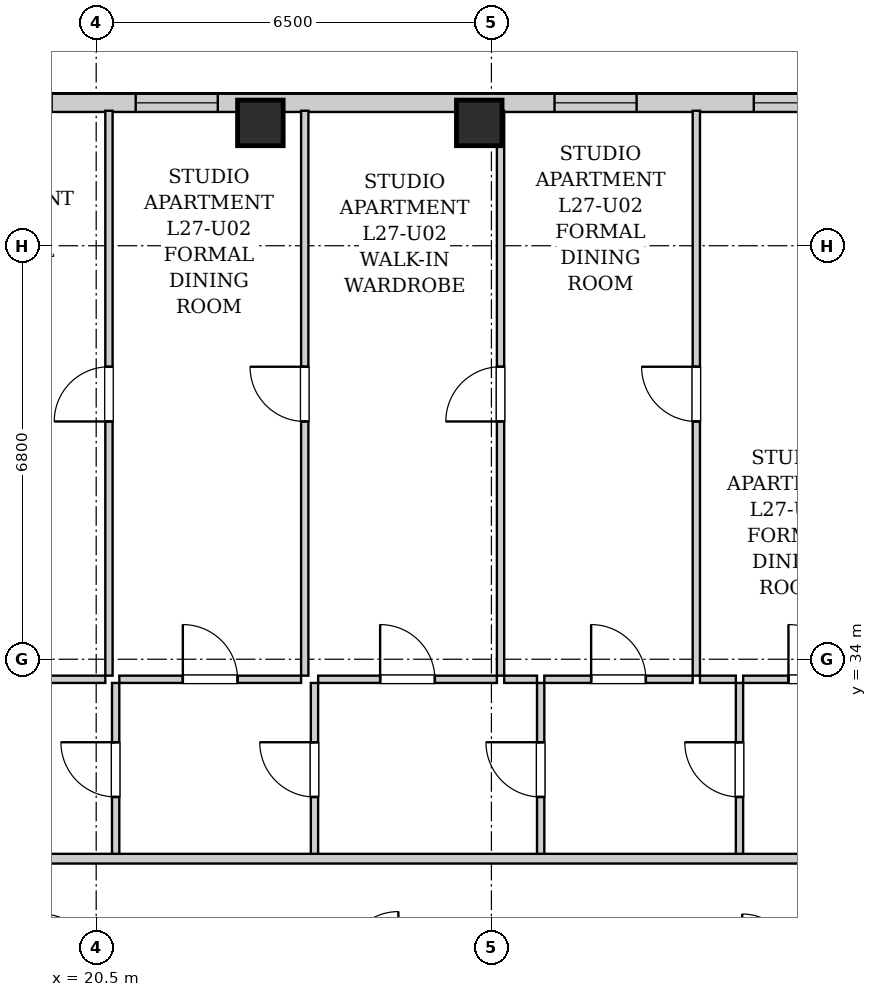
"""IFC4 building model, lengths in metres.
Left out: names, types, materials, properties, quantities, classifications, styles, units other than length and angle.
Written with IfcOpenShell. Run it as: python <this file> out.ifc"""

import sys

from ifc_helpers import new_model, si_unit, direction, frame, frame_2d, origin, origin_2d, place, context, subcontext, project, spatial, rectangle, extrude, element, fill, save


model = new_model("IFC4")
c1 = context("Model", 3, precision=1e-05, world=origin(), true_north=direction((0.0, 1.0)))
c2 = subcontext(c1, "Body", "Model", "MODEL_VIEW")
j1 = project(units=[si_unit("LENGTHUNIT", "METRE"), si_unit("PLANEANGLEUNIT", "RADIAN")], contexts=[c1])
p1 = place(None, origin())
s1 = spatial("IfcSite", under=j1, at=p1, CompositionType="ELEMENT")
p2 = place(p1, origin())
s2 = spatial("IfcBuilding", under=s1, at=p2, CompositionType="ELEMENT")
p3 = place(p2, frame((0.0, 0.0, 97.5)))
s3 = spatial("IfcBuildingStorey", under=s2, at=p3, CompositionType="ELEMENT", Elevation=97.5)
for number, where, z_axis, x_axis in (
    (1, (23.2, 42.82, 0.0), (0.0, 0.0, 1.0), (1.0, 0.0, 0.0)),
    (2, (26.8, 42.82, 0.0), (0.0, 0.0, 1.0), (1.0, 0.0, 0.0)),
):
    element("IfcColumn", number, at=place(p3, frame(where, z_axis=z_axis, x_axis=x_axis)), inside=s3, PredefinedType="COLUMN", context=c2, shape_type="SweptSolid", body=[
        extrude(rectangle(XDim=0.75, YDim=0.75, at=origin_2d()), origin(), (0.0, 0.0, 1.0), 3.2),
    ])
p4 = place(p3, frame((10.0, 43.15, 0.0), z_axis=(0.0, 0.0, 1.0), x_axis=(1.0, 0.0, 0.0)))
e3 = element("IfcWall", 3, at=p4, inside=s3, PredefinedType="SOLIDWALL", context=c2, shape_type="SweptSolid", body=[
    extrude(rectangle(XDim=24.35, YDim=0.3, at=frame_2d((12.175, 0.0))), origin(), (0.0, 0.0, 1.0), 2.94),
])
p5 = place(p4, frame((1.956, 0.0, 0.55)))
e4 = element("IfcOpeningElement", 4, at=p5, cuts=e3, PredefinedType="OPENING", context=c2, shape_type="SweptSolid", body=[
    extrude(rectangle(XDim=1.35, YDim=1.2, at=frame_2d((0.675, 0.6))), frame((0.0, 0.16, 0.0), z_axis=(0.0, -1.0, 0.0), x_axis=(1.0, 0.0, 0.0)), (0.0, 0.0, 1.0), 0.32),
])
p6 = place(p4, frame((5.187, 0.0, 0.55)))
e5 = element("IfcOpeningElement", 5, at=p6, cuts=e3, PredefinedType="OPENING", context=c2, shape_type="SweptSolid", body=[
    extrude(rectangle(XDim=1.35, YDim=1.2, at=frame_2d((0.675, 0.6))), frame((0.0, 0.16, 0.0), z_axis=(0.0, -1.0, 0.0), x_axis=(1.0, 0.0, 0.0)), (0.0, 0.0, 1.0), 0.32),
])
p7 = place(p4, frame((8.418, 0.0, 0.55)))
e6 = element("IfcOpeningElement", 6, at=p7, cuts=e3, PredefinedType="OPENING", context=c2, shape_type="SweptSolid", body=[
    extrude(rectangle(XDim=1.35, YDim=1.2, at=frame_2d((0.675, 0.6))), frame((0.0, 0.16, 0.0), z_axis=(0.0, -1.0, 0.0), x_axis=(1.0, 0.0, 0.0)), (0.0, 0.0, 1.0), 0.32),
])
p8 = place(p4, frame((11.15, 0.0, 0.55)))
e7 = element("IfcOpeningElement", 7, at=p8, cuts=e3, PredefinedType="OPENING", context=c2, shape_type="SweptSolid", body=[
    extrude(rectangle(XDim=1.35, YDim=1.2, at=frame_2d((0.675, 0.6))), frame((0.0, 0.16, 0.0), z_axis=(0.0, -1.0, 0.0), x_axis=(1.0, 0.0, 0.0)), (0.0, 0.0, 1.0), 0.32),
])
p9 = place(p4, frame((18.038, 0.0, 0.55)))
e8 = element("IfcOpeningElement", 8, at=p9, cuts=e3, PredefinedType="OPENING", context=c2, shape_type="SweptSolid", body=[
    extrude(rectangle(XDim=1.35, YDim=1.2, at=frame_2d((0.675, 0.6))), frame((0.0, 0.16, 0.0), z_axis=(0.0, -1.0, 0.0), x_axis=(1.0, 0.0, 0.0)), (0.0, 0.0, 1.0), 0.32),
])
p10 = place(p4, frame((21.315, 0.0, 0.55)))
e9 = element("IfcOpeningElement", 9, at=p10, cuts=e3, PredefinedType="OPENING", context=c2, shape_type="SweptSolid", body=[
    extrude(rectangle(XDim=1.35, YDim=1.2, at=frame_2d((0.675, 0.6))), frame((0.0, 0.16, 0.0), z_axis=(0.0, -1.0, 0.0), x_axis=(1.0, 0.0, 0.0)), (0.0, 0.0, 1.0), 0.32),
])
p11 = place(p3, frame((20.82, 30.76, 0.0), z_axis=(0.0, 0.0, 1.0), x_axis=(0.0, 1.0, 0.0)))
e10 = element("IfcWall", 10, at=p11, inside=s3, PredefinedType="PARTITIONING", context=c2, shape_type="SweptSolid", body=[
    extrude(rectangle(XDim=2.85, YDim=0.12, at=frame_2d((1.425, 0.0))), origin(), (0.0, 0.0, 1.0), 2.94),
])
p12 = place(p11, frame((0.975, 0.0, 0.0)))
e11 = element("IfcOpeningElement", 11, at=p12, cuts=e10, PredefinedType="OPENING", context=c2, shape_type="SweptSolid", body=[
    extrude(rectangle(XDim=0.9, YDim=2.05, at=frame_2d((0.45, 1.025))), frame((0.0, 0.07, 0.0), z_axis=(0.0, -1.0, 0.0), x_axis=(1.0, 0.0, 0.0)), (0.0, 0.0, 1.0), 0.14),
])
p13 = place(p3, frame((17.55, 33.67, 0.0), z_axis=(0.0, 0.0, 1.0), x_axis=(1.0, 0.0, 0.0)))
e12 = element("IfcWall", 12, at=p13, inside=s3, PredefinedType="PARTITIONING", context=c2, shape_type="SweptSolid", body=[
    extrude(rectangle(XDim=3.1, YDim=0.12, at=frame_2d((1.55, 0.0))), origin(), (0.0, 0.0, 1.0), 2.94),
])
p14 = place(p13, frame((1.1, 0.0, 0.0)))
e13 = element("IfcOpeningElement", 13, at=p14, cuts=e12, PredefinedType="OPENING", context=c2, shape_type="SweptSolid", body=[
    extrude(rectangle(XDim=0.9, YDim=2.05, at=frame_2d((0.45, 1.025))), frame((0.0, 0.07, 0.0), z_axis=(0.0, -1.0, 0.0), x_axis=(1.0, 0.0, 0.0)), (0.0, 0.0, 1.0), 0.14),
])
p15 = place(p3, frame((24.09, 30.76, 0.0), z_axis=(0.0, 0.0, 1.0), x_axis=(0.0, 1.0, 0.0)))
e14 = element("IfcWall", 14, at=p15, inside=s3, PredefinedType="PARTITIONING", context=c2, shape_type="SweptSolid", body=[
    extrude(rectangle(XDim=2.85, YDim=0.12, at=frame_2d((1.425, 0.0))), origin(), (0.0, 0.0, 1.0), 2.94),
])
p16 = place(p15, frame((0.975, 0.0, 0.0)))
e15 = element("IfcOpeningElement", 15, at=p16, cuts=e14, PredefinedType="OPENING", context=c2, shape_type="SweptSolid", body=[
    extrude(rectangle(XDim=0.9, YDim=2.05, at=frame_2d((0.45, 1.025))), frame((0.0, 0.07, 0.0), z_axis=(0.0, -1.0, 0.0), x_axis=(1.0, 0.0, 0.0)), (0.0, 0.0, 1.0), 0.14),
])
p17 = place(p3, frame((20.88, 33.67, 0.0), z_axis=(0.0, 0.0, 1.0), x_axis=(1.0, 0.0, 0.0)))
e16 = element("IfcWall", 16, at=p17, inside=s3, PredefinedType="PARTITIONING", context=c2, shape_type="SweptSolid", body=[
    extrude(rectangle(XDim=2.99, YDim=0.12, at=frame_2d((1.495, 0.0))), origin(), (0.0, 0.0, 1.0), 2.94),
])
p18 = place(p17, frame((1.045, 0.0, 0.0)))
e17 = element("IfcOpeningElement", 17, at=p18, cuts=e16, PredefinedType="OPENING", context=c2, shape_type="SweptSolid", body=[
    extrude(rectangle(XDim=0.9, YDim=2.05, at=frame_2d((0.45, 1.025))), frame((0.0, 0.07, 0.0), z_axis=(0.0, -1.0, 0.0), x_axis=(1.0, 0.0, 0.0)), (0.0, 0.0, 1.0), 0.14),
])
p19 = place(p3, frame((27.81, 30.76, 0.0), z_axis=(0.0, 0.0, 1.0), x_axis=(0.0, 1.0, 0.0)))
e18 = element("IfcWall", 18, at=p19, inside=s3, PredefinedType="PARTITIONING", context=c2, shape_type="SweptSolid", body=[
    extrude(rectangle(XDim=2.85, YDim=0.12, at=frame_2d((1.425, 0.0))), origin(), (0.0, 0.0, 1.0), 2.94),
])
p20 = place(p19, frame((0.975, 0.0, 0.0)))
e19 = element("IfcOpeningElement", 19, at=p20, cuts=e18, PredefinedType="OPENING", context=c2, shape_type="SweptSolid", body=[
    extrude(rectangle(XDim=0.9, YDim=2.05, at=frame_2d((0.45, 1.025))), frame((0.0, 0.07, 0.0), z_axis=(0.0, -1.0, 0.0), x_axis=(1.0, 0.0, 0.0)), (0.0, 0.0, 1.0), 0.14),
])
p21 = place(p3, frame((24.15, 33.67, 0.0), z_axis=(0.0, 0.0, 1.0), x_axis=(1.0, 0.0, 0.0)))
e20 = element("IfcWall", 20, at=p21, inside=s3, PredefinedType="PARTITIONING", context=c2, shape_type="SweptSolid", body=[
    extrude(rectangle(XDim=2.94, YDim=0.12, at=frame_2d((1.47, 0.0))), origin(), (0.0, 0.0, 1.0), 2.94),
])
p22 = place(p21, frame((1.02, 0.0, 0.0)))
e21 = element("IfcOpeningElement", 21, at=p22, cuts=e20, PredefinedType="OPENING", context=c2, shape_type="SweptSolid", body=[
    extrude(rectangle(XDim=0.9, YDim=2.05, at=frame_2d((0.45, 1.025))), frame((0.0, 0.07, 0.0), z_axis=(0.0, -1.0, 0.0), x_axis=(1.0, 0.0, 0.0)), (0.0, 0.0, 1.0), 0.14),
])
p23 = place(p3, frame((27.21, 33.67, 0.0), z_axis=(0.0, 0.0, 1.0), x_axis=(1.0, 0.0, 0.0)))
e22 = element("IfcWall", 22, at=p23, inside=s3, PredefinedType="PARTITIONING", context=c2, shape_type="SweptSolid", body=[
    extrude(rectangle(XDim=0.54, YDim=0.12, at=frame_2d((0.27, 0.0))), origin(), (0.0, 0.0, 1.0), 2.94),
])
p24 = place(p3, frame((31.08, 30.76, 0.0), z_axis=(0.0, 0.0, 1.0), x_axis=(0.0, 1.0, 0.0)))
e23 = element("IfcWall", 23, at=p24, inside=s3, PredefinedType="PARTITIONING", context=c2, shape_type="SweptSolid", body=[
    extrude(rectangle(XDim=2.85, YDim=0.12, at=frame_2d((1.425, 0.0))), origin(), (0.0, 0.0, 1.0), 2.94),
])
p25 = place(p24, frame((0.975, 0.0, 0.0)))
e24 = element("IfcOpeningElement", 24, at=p25, cuts=e23, PredefinedType="OPENING", context=c2, shape_type="SweptSolid", body=[
    extrude(rectangle(XDim=0.9, YDim=2.05, at=frame_2d((0.45, 1.025))), frame((0.0, 0.07, 0.0), z_axis=(0.0, -1.0, 0.0), x_axis=(1.0, 0.0, 0.0)), (0.0, 0.0, 1.0), 0.14),
])
p26 = place(p3, frame((27.87, 33.67, 0.0), z_axis=(0.0, 0.0, 1.0), x_axis=(1.0, 0.0, 0.0)))
e25 = element("IfcWall", 25, at=p26, inside=s3, PredefinedType="PARTITIONING", context=c2, shape_type="SweptSolid", body=[
    extrude(rectangle(XDim=2.44, YDim=0.12, at=frame_2d((1.22, 0.0))), origin(), (0.0, 0.0, 1.0), 2.94),
])
p27 = place(p26, frame((0.77, 0.0, 0.0)))
e26 = element("IfcOpeningElement", 26, at=p27, cuts=e25, PredefinedType="OPENING", context=c2, shape_type="SweptSolid", body=[
    extrude(rectangle(XDim=0.9, YDim=2.05, at=frame_2d((0.45, 1.025))), frame((0.0, 0.07, 0.0), z_axis=(0.0, -1.0, 0.0), x_axis=(1.0, 0.0, 0.0)), (0.0, 0.0, 1.0), 0.14),
])
p28 = place(p3, frame((30.43, 33.67, 0.0), z_axis=(0.0, 0.0, 1.0), x_axis=(1.0, 0.0, 0.0)))
e27 = element("IfcWall", 27, at=p28, inside=s3, PredefinedType="PARTITIONING", context=c2, shape_type="SweptSolid", body=[
    extrude(rectangle(XDim=0.59, YDim=0.12, at=frame_2d((0.295, 0.0))), origin(), (0.0, 0.0, 1.0), 2.94),
])
p29 = place(p3, frame((31.14, 33.67, 0.0), z_axis=(0.0, 0.0, 1.0), x_axis=(1.0, 0.0, 0.0)))
e28 = element("IfcWall", 28, at=p29, inside=s3, PredefinedType="PARTITIONING", context=c2, shape_type="SweptSolid", body=[
    extrude(rectangle(XDim=2.39, YDim=0.12, at=frame_2d((1.195, 0.0))), origin(), (0.0, 0.0, 1.0), 2.94),
])
p30 = place(p29, frame((0.745, 0.0, 0.0)))
e29 = element("IfcOpeningElement", 29, at=p30, cuts=e28, PredefinedType="OPENING", context=c2, shape_type="SweptSolid", body=[
    extrude(rectangle(XDim=0.9, YDim=2.05, at=frame_2d((0.45, 1.025))), frame((0.0, 0.07, 0.0), z_axis=(0.0, -1.0, 0.0), x_axis=(1.0, 0.0, 0.0)), (0.0, 0.0, 1.0), 0.14),
])
p31 = place(p3, frame((20.71, 33.73, 0.0), z_axis=(0.0, 0.0, 1.0), x_axis=(0.0, 1.0, 0.0)))
e30 = element("IfcWall", 30, at=p31, inside=s3, PredefinedType="PARTITIONING", context=c2, shape_type="SweptSolid", body=[
    extrude(rectangle(XDim=9.29, YDim=0.12, at=frame_2d((4.645, 0.0))), origin(), (0.0, 0.0, 1.0), 2.94),
])
p32 = place(p31, frame((4.18, 0.0, 0.0)))
e31 = element("IfcOpeningElement", 31, at=p32, cuts=e30, PredefinedType="OPENING", context=c2, shape_type="SweptSolid", body=[
    extrude(rectangle(XDim=0.9, YDim=2.05, at=frame_2d((0.45, 1.025))), frame((0.0, 0.07, 0.0), z_axis=(0.0, -1.0, 0.0), x_axis=(1.0, 0.0, 0.0)), (0.0, 0.0, 1.0), 0.14),
])
p33 = place(p3, frame((23.93, 33.73, 0.0), z_axis=(0.0, 0.0, 1.0), x_axis=(0.0, 1.0, 0.0)))
e32 = element("IfcWall", 32, at=p33, inside=s3, PredefinedType="PARTITIONING", context=c2, shape_type="SweptSolid", body=[
    extrude(rectangle(XDim=9.29, YDim=0.12, at=frame_2d((4.645, 0.0))), origin(), (0.0, 0.0, 1.0), 2.94),
])
p34 = place(p33, frame((4.18, 0.0, 0.0)))
e33 = element("IfcOpeningElement", 33, at=p34, cuts=e32, PredefinedType="OPENING", context=c2, shape_type="SweptSolid", body=[
    extrude(rectangle(XDim=0.9, YDim=2.05, at=frame_2d((0.45, 1.025))), frame((0.0, 0.07, 0.0), z_axis=(0.0, -1.0, 0.0), x_axis=(1.0, 0.0, 0.0)), (0.0, 0.0, 1.0), 0.14),
])
p35 = place(p3, frame((27.15, 33.73, 0.0), z_axis=(0.0, 0.0, 1.0), x_axis=(0.0, 1.0, 0.0)))
e34 = element("IfcWall", 34, at=p35, inside=s3, PredefinedType="PARTITIONING", context=c2, shape_type="SweptSolid", body=[
    extrude(rectangle(XDim=9.29, YDim=0.12, at=frame_2d((4.645, 0.0))), origin(), (0.0, 0.0, 1.0), 2.94),
])
p36 = place(p35, frame((4.18, 0.0, 0.0)))
e35 = element("IfcOpeningElement", 35, at=p36, cuts=e34, PredefinedType="OPENING", context=c2, shape_type="SweptSolid", body=[
    extrude(rectangle(XDim=0.9, YDim=2.05, at=frame_2d((0.45, 1.025))), frame((0.0, 0.07, 0.0), z_axis=(0.0, -1.0, 0.0), x_axis=(1.0, 0.0, 0.0)), (0.0, 0.0, 1.0), 0.14),
])
p37 = place(p3, frame((30.37, 33.73, 0.0), z_axis=(0.0, 0.0, 1.0), x_axis=(0.0, 1.0, 0.0)))
e36 = element("IfcWall", 36, at=p37, inside=s3, PredefinedType="PARTITIONING", context=c2, shape_type="SweptSolid", body=[
    extrude(rectangle(XDim=9.29, YDim=0.12, at=frame_2d((4.645, 0.0))), origin(), (0.0, 0.0, 1.0), 2.94),
])
p38 = place(p37, frame((4.18, 0.0, 0.0)))
e37 = element("IfcOpeningElement", 37, at=p38, cuts=e36, PredefinedType="OPENING", context=c2, shape_type="SweptSolid", body=[
    extrude(rectangle(XDim=0.9, YDim=2.05, at=frame_2d((0.45, 1.025))), frame((0.0, 0.07, 0.0), z_axis=(0.0, -1.0, 0.0), x_axis=(1.0, 0.0, 0.0)), (0.0, 0.0, 1.0), 0.14),
])
p39 = place(p3, frame((10.05, 30.72, 0.0), z_axis=(0.0, 0.0, 1.0), x_axis=(1.0, 0.0, 0.0)))
e38 = element("IfcWall", 38, at=p39, inside=s3, PredefinedType="PARTITIONING", context=c2, shape_type="SweptSolid", body=[
    extrude(rectangle(XDim=30.8, YDim=0.16, at=frame_2d((15.4, 0.0))), origin(), (0.0, 0.0, 1.0), 2.94),
])
p40 = place(p39, frame((4.295, 0.0, 0.0)))
e39 = element("IfcOpeningElement", 39, at=p40, cuts=e38, PredefinedType="OPENING", context=c2, shape_type="SweptSolid", body=[
    extrude(rectangle(XDim=0.95, YDim=2.1, at=frame_2d((0.475, 1.05))), frame((0.0, 0.09, 0.0), z_axis=(0.0, -1.0, 0.0), x_axis=(1.0, 0.0, 0.0)), (0.0, 0.0, 1.0), 0.18),
])
p41 = place(p12, origin())
e40 = element("IfcDoor", 40, at=p41, inside=s3, OperationType="SINGLE_SWING_RIGHT", PredefinedType="DOOR", context=c2, shape_type="SweptSolid", body=[
    extrude(rectangle(XDim=0.9, YDim=2.05, at=frame_2d((0.45, 1.025))), frame((0.0, 0.025, 0.0), z_axis=(0.0, -1.0, 0.0), x_axis=(1.0, 0.0, 0.0)), (0.0, 0.0, 1.0), 0.05),
])
fill(e11, e40)
p42 = place(p16, origin())
e41 = element("IfcDoor", 41, at=p42, inside=s3, OperationType="SINGLE_SWING_RIGHT", PredefinedType="DOOR", context=c2, shape_type="SweptSolid", body=[
    extrude(rectangle(XDim=0.9, YDim=2.05, at=frame_2d((0.45, 1.025))), frame((0.0, 0.025, 0.0), z_axis=(0.0, -1.0, 0.0), x_axis=(1.0, 0.0, 0.0)), (0.0, 0.0, 1.0), 0.05),
])
fill(e15, e41)
p43 = place(p18, origin())
e42 = element("IfcDoor", 42, at=p43, inside=s3, OperationType="SINGLE_SWING_LEFT", PredefinedType="DOOR", context=c2, shape_type="SweptSolid", body=[
    extrude(rectangle(XDim=0.9, YDim=2.05, at=frame_2d((0.45, 1.025))), frame((0.0, 0.025, 0.0), z_axis=(0.0, -1.0, 0.0), x_axis=(1.0, 0.0, 0.0)), (0.0, 0.0, 1.0), 0.05),
])
fill(e17, e42)
p44 = place(p20, origin())
e43 = element("IfcDoor", 43, at=p44, inside=s3, OperationType="SINGLE_SWING_RIGHT", PredefinedType="DOOR", context=c2, shape_type="SweptSolid", body=[
    extrude(rectangle(XDim=0.9, YDim=2.05, at=frame_2d((0.45, 1.025))), frame((0.0, 0.025, 0.0), z_axis=(0.0, -1.0, 0.0), x_axis=(1.0, 0.0, 0.0)), (0.0, 0.0, 1.0), 0.05),
])
fill(e19, e43)
p45 = place(p22, origin())
e44 = element("IfcDoor", 44, at=p45, inside=s3, OperationType="SINGLE_SWING_LEFT", PredefinedType="DOOR", context=c2, shape_type="SweptSolid", body=[
    extrude(rectangle(XDim=0.9, YDim=2.05, at=frame_2d((0.45, 1.025))), frame((0.0, 0.025, 0.0), z_axis=(0.0, -1.0, 0.0), x_axis=(1.0, 0.0, 0.0)), (0.0, 0.0, 1.0), 0.05),
])
fill(e21, e44)
p46 = place(p25, origin())
e45 = element("IfcDoor", 45, at=p46, inside=s3, OperationType="SINGLE_SWING_RIGHT", PredefinedType="DOOR", context=c2, shape_type="SweptSolid", body=[
    extrude(rectangle(XDim=0.9, YDim=2.05, at=frame_2d((0.45, 1.025))), frame((0.0, 0.025, 0.0), z_axis=(0.0, -1.0, 0.0), x_axis=(1.0, 0.0, 0.0)), (0.0, 0.0, 1.0), 0.05),
])
fill(e24, e45)
p47 = place(p27, origin())
e46 = element("IfcDoor", 46, at=p47, inside=s3, OperationType="SINGLE_SWING_LEFT", PredefinedType="DOOR", context=c2, shape_type="SweptSolid", body=[
    extrude(rectangle(XDim=0.9, YDim=2.05, at=frame_2d((0.45, 1.025))), frame((0.0, 0.025, 0.0), z_axis=(0.0, -1.0, 0.0), x_axis=(1.0, 0.0, 0.0)), (0.0, 0.0, 1.0), 0.05),
])
fill(e26, e46)
p48 = place(p30, origin())
e47 = element("IfcDoor", 47, at=p48, inside=s3, OperationType="SINGLE_SWING_LEFT", PredefinedType="DOOR", context=c2, shape_type="SweptSolid", body=[
    extrude(rectangle(XDim=0.9, YDim=2.05, at=frame_2d((0.45, 1.025))), frame((0.0, 0.025, 0.0), z_axis=(0.0, -1.0, 0.0), x_axis=(1.0, 0.0, 0.0)), (0.0, 0.0, 1.0), 0.05),
])
fill(e29, e47)
p49 = place(p32, origin())
e48 = element("IfcDoor", 48, at=p49, inside=s3, OperationType="SINGLE_SWING_LEFT", PredefinedType="DOOR", context=c2, shape_type="SweptSolid", body=[
    extrude(rectangle(XDim=0.9, YDim=2.05, at=frame_2d((0.45, 1.025))), frame((0.0, 0.025, 0.0), z_axis=(0.0, -1.0, 0.0), x_axis=(1.0, 0.0, 0.0)), (0.0, 0.0, 1.0), 0.05),
])
fill(e31, e48)
p50 = place(p34, origin())
e49 = element("IfcDoor", 49, at=p50, inside=s3, OperationType="SINGLE_SWING_RIGHT", PredefinedType="DOOR", context=c2, shape_type="SweptSolid", body=[
    extrude(rectangle(XDim=0.9, YDim=2.05, at=frame_2d((0.45, 1.025))), frame((0.0, 0.025, 0.0), z_axis=(0.0, -1.0, 0.0), x_axis=(1.0, 0.0, 0.0)), (0.0, 0.0, 1.0), 0.05),
])
fill(e33, e49)
p51 = place(p36, origin())
e50 = element("IfcDoor", 50, at=p51, inside=s3, OperationType="SINGLE_SWING_LEFT", PredefinedType="DOOR", context=c2, shape_type="SweptSolid", body=[
    extrude(rectangle(XDim=0.9, YDim=2.05, at=frame_2d((0.45, 1.025))), frame((0.0, 0.025, 0.0), z_axis=(0.0, -1.0, 0.0), x_axis=(1.0, 0.0, 0.0)), (0.0, 0.0, 1.0), 0.05),
])
fill(e35, e50)
p52 = place(p38, origin())
e51 = element("IfcDoor", 51, at=p52, inside=s3, OperationType="SINGLE_SWING_RIGHT", PredefinedType="DOOR", context=c2, shape_type="SweptSolid", body=[
    extrude(rectangle(XDim=0.9, YDim=2.05, at=frame_2d((0.45, 1.025))), frame((0.0, 0.025, 0.0), z_axis=(0.0, -1.0, 0.0), x_axis=(1.0, 0.0, 0.0)), (0.0, 0.0, 1.0), 0.05),
])
fill(e37, e51)
p53 = place(p8, origin())
e52 = element("IfcWindow", 52, at=p53, inside=s3, PartitioningType="SINGLE_PANEL", PredefinedType="WINDOW", context=c2, shape_type="SweptSolid", body=[
    extrude(rectangle(XDim=1.35, YDim=1.2, at=frame_2d((0.675, 0.6))), frame((0.0, 0.03, 0.0), z_axis=(0.0, -1.0, 0.0), x_axis=(1.0, 0.0, 0.0)), (0.0, 0.0, 1.0), 0.06),
])
fill(e7, e52)
p54 = place(p9, origin())
e53 = element("IfcWindow", 53, at=p54, inside=s3, PartitioningType="SINGLE_PANEL", PredefinedType="WINDOW", context=c2, shape_type="SweptSolid", body=[
    extrude(rectangle(XDim=1.35, YDim=1.2, at=frame_2d((0.675, 0.6))), frame((0.0, 0.03, 0.0), z_axis=(0.0, -1.0, 0.0), x_axis=(1.0, 0.0, 0.0)), (0.0, 0.0, 1.0), 0.06),
])
fill(e8, e53)
p55 = place(p10, origin())
e54 = element("IfcWindow", 54, at=p55, inside=s3, PartitioningType="SINGLE_PANEL", PredefinedType="WINDOW", context=c2, shape_type="SweptSolid", body=[
    extrude(rectangle(XDim=1.35, YDim=1.2, at=frame_2d((0.675, 0.6))), frame((0.0, 0.03, 0.0), z_axis=(0.0, -1.0, 0.0), x_axis=(1.0, 0.0, 0.0)), (0.0, 0.0, 1.0), 0.06),
])
fill(e9, e54)
save(model, sys.argv[1])
